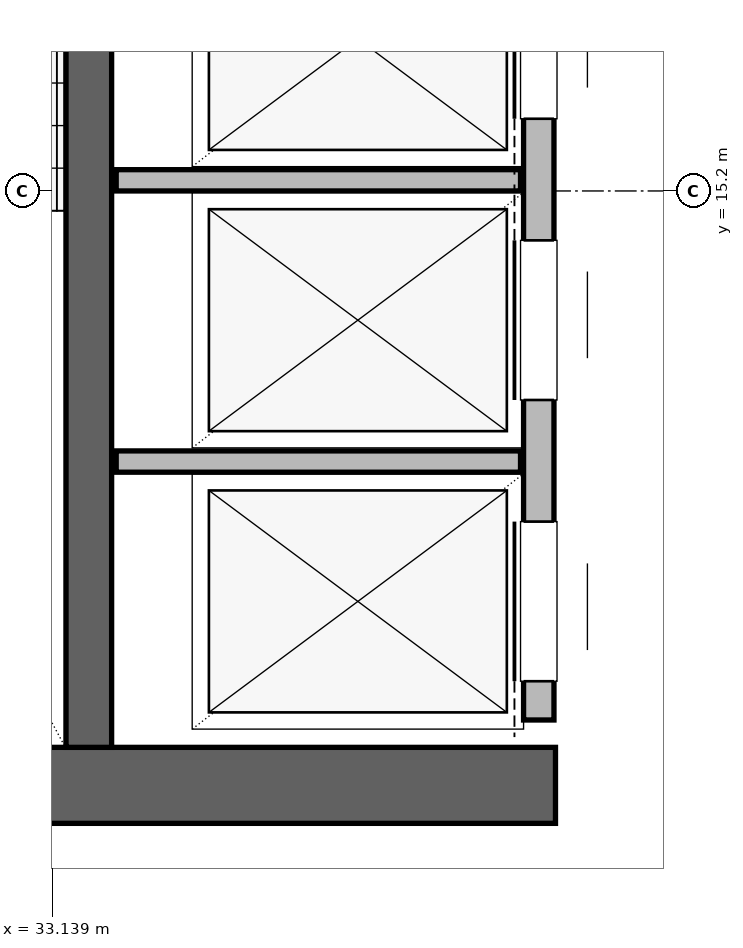
"""IFC4 building model, lengths in metres.
Left out: names, types, materials, properties, quantities, classifications, styles, units other than length and angle.
Written with IfcOpenShell. Run it as: python <this file> out.ifc"""

import sys

from ifc_helpers import new_model, si_unit, direction, frame, frame_2d, origin, place, context, subcontext, project, spatial, rectangle, extrude, element, fill, save


model = new_model("IFC4")
c1 = context("Model", 3, precision=1e-05, world=origin(), true_north=direction((0.0, 1.0)))
c2 = subcontext(c1, "Body", "Model", "MODEL_VIEW")
j1 = project(units=[si_unit("LENGTHUNIT", "METRE"), si_unit("PLANEANGLEUNIT", "RADIAN")], contexts=[c1])
p1 = place(None, origin())
s1 = spatial("IfcSite", under=j1, at=p1, CompositionType="ELEMENT")
p2 = place(p1, origin())
s2 = spatial("IfcBuilding", under=s1, at=p2, CompositionType="ELEMENT")
p3 = place(p2, frame((0.0, 0.0, 27.3)))
s3 = spatial("IfcBuildingStorey", under=s2, at=p3, CompositionType="ELEMENT", Elevation=27.3)
p4 = place(p3, frame((29.35, 11.29, 0.0), z_axis=(0.0, 0.0, 1.0), x_axis=(1.0, 0.0, 0.0)))
e1 = element("IfcWall", 1, at=p4, inside=s3, PredefinedType="SHEAR", context=c2, shape_type="SweptSolid", body=[
    extrude(rectangle(XDim=7.1, YDim=0.5, at=frame_2d((3.55, 0.0))), origin(), (0.0, 0.0, 1.0), 3.36),
])
p5 = place(p3, frame((33.38, 11.54, 0.0), z_axis=(0.0, 0.0, 1.0), x_axis=(0.0, 1.0, 0.0)))
e2 = element("IfcWall", 2, at=p5, inside=s3, PredefinedType="SHEAR", context=c2, shape_type="SweptSolid", body=[
    extrude(rectangle(XDim=7.62, YDim=0.3, at=frame_2d((3.81, 0.0))), origin(), (0.0, 0.0, 1.0), 3.36),
])
p6 = place(p3, frame((36.34, 11.72, 0.0), z_axis=(0.0, 0.0, 1.0), x_axis=(0.0, 1.0, 0.0)))
e3 = element("IfcWall", 3, at=p6, inside=s3, PredefinedType="PARTITIONING", context=c2, shape_type="SweptSolid", body=[
    extrude(rectangle(XDim=7.6, YDim=0.2, at=frame_2d((3.8, 0.0))), origin(), (0.0, 0.0, 1.0), 3.36),
])
p7 = place(p6, frame((0.255, 0.0, 0.0)))
e4 = element("IfcOpeningElement", 4, at=p7, cuts=e3, PredefinedType="OPENING", context=c2, shape_type="SweptSolid", body=[
    extrude(rectangle(XDim=1.05, YDim=2.15, at=frame_2d((0.525, 1.075))), frame((0.0, 0.1, 0.0), z_axis=(0.0, -1.0, 0.0), x_axis=(1.0, 0.0, 0.0)), (0.0, 0.0, 1.0), 0.2),
])
p8 = place(p6, frame((2.105, 0.0, 0.0)))
e5 = element("IfcOpeningElement", 5, at=p8, cuts=e3, PredefinedType="OPENING", context=c2, shape_type="SweptSolid", body=[
    extrude(rectangle(XDim=1.05, YDim=2.15, at=frame_2d((0.525, 1.075))), frame((0.0, 0.1, 0.0), z_axis=(0.0, -1.0, 0.0), x_axis=(1.0, 0.0, 0.0)), (0.0, 0.0, 1.0), 0.2),
])
p9 = place(p6, frame((3.955, 0.0, 0.0)))
e6 = element("IfcOpeningElement", 6, at=p9, cuts=e3, PredefinedType="OPENING", context=c2, shape_type="SweptSolid", body=[
    extrude(rectangle(XDim=1.05, YDim=2.15, at=frame_2d((0.525, 1.075))), frame((0.0, 0.1, 0.0), z_axis=(0.0, -1.0, 0.0), x_axis=(1.0, 0.0, 0.0)), (0.0, 0.0, 1.0), 0.2),
])
for number, where, z_axis, x_axis in (
    (7, (33.56, 13.42, 0.0), (0.0, 0.0, 1.0), (1.0, 0.0, 0.0)),
    (8, (33.56, 15.27, 0.0), (0.0, 0.0, 1.0), (1.0, 0.0, 0.0)),
):
    element("IfcWall", number, at=place(p3, frame(where, z_axis=z_axis, x_axis=x_axis)), inside=s3, PredefinedType="PARTITIONING", context=c2, shape_type="SweptSolid", body=[
        extrude(rectangle(XDim=2.66, YDim=0.14, at=frame_2d((1.33, 0.0))), origin(), (0.0, 0.0, 1.0), 3.36),
    ])
p10 = place(p7, origin())
e9 = element("IfcDoor", 9, at=p10, inside=s3, OperationType="SLIDING_TO_LEFT", PredefinedType="DOOR", context=c2, shape_type="SweptSolid", body=[
    extrude(rectangle(XDim=1.05, YDim=2.15, at=frame_2d((0.525, 1.075))), frame((0.0, 0.025, 0.0), z_axis=(0.0, -1.0, 0.0), x_axis=(1.0, 0.0, 0.0)), (0.0, 0.0, 1.0), 0.05),
])
fill(e4, e9)
p11 = place(p8, origin())
e10 = element("IfcDoor", 10, at=p11, inside=s3, OperationType="SLIDING_TO_RIGHT", PredefinedType="DOOR", context=c2, shape_type="SweptSolid", body=[
    extrude(rectangle(XDim=1.05, YDim=2.15, at=frame_2d((0.525, 1.075))), frame((0.0, 0.025, 0.0), z_axis=(0.0, -1.0, 0.0), x_axis=(1.0, 0.0, 0.0)), (0.0, 0.0, 1.0), 0.05),
])
fill(e5, e10)
p12 = place(p9, origin())
e11 = element("IfcDoor", 11, at=p12, inside=s3, OperationType="SLIDING_TO_LEFT", PredefinedType="DOOR", context=c2, shape_type="SweptSolid", body=[
    extrude(rectangle(XDim=1.05, YDim=2.15, at=frame_2d((0.525, 1.075))), frame((0.0, 0.025, 0.0), z_axis=(0.0, -1.0, 0.0), x_axis=(1.0, 0.0, 0.0)), (0.0, 0.0, 1.0), 0.05),
])
fill(e6, e11)
save(model, sys.argv[1])
